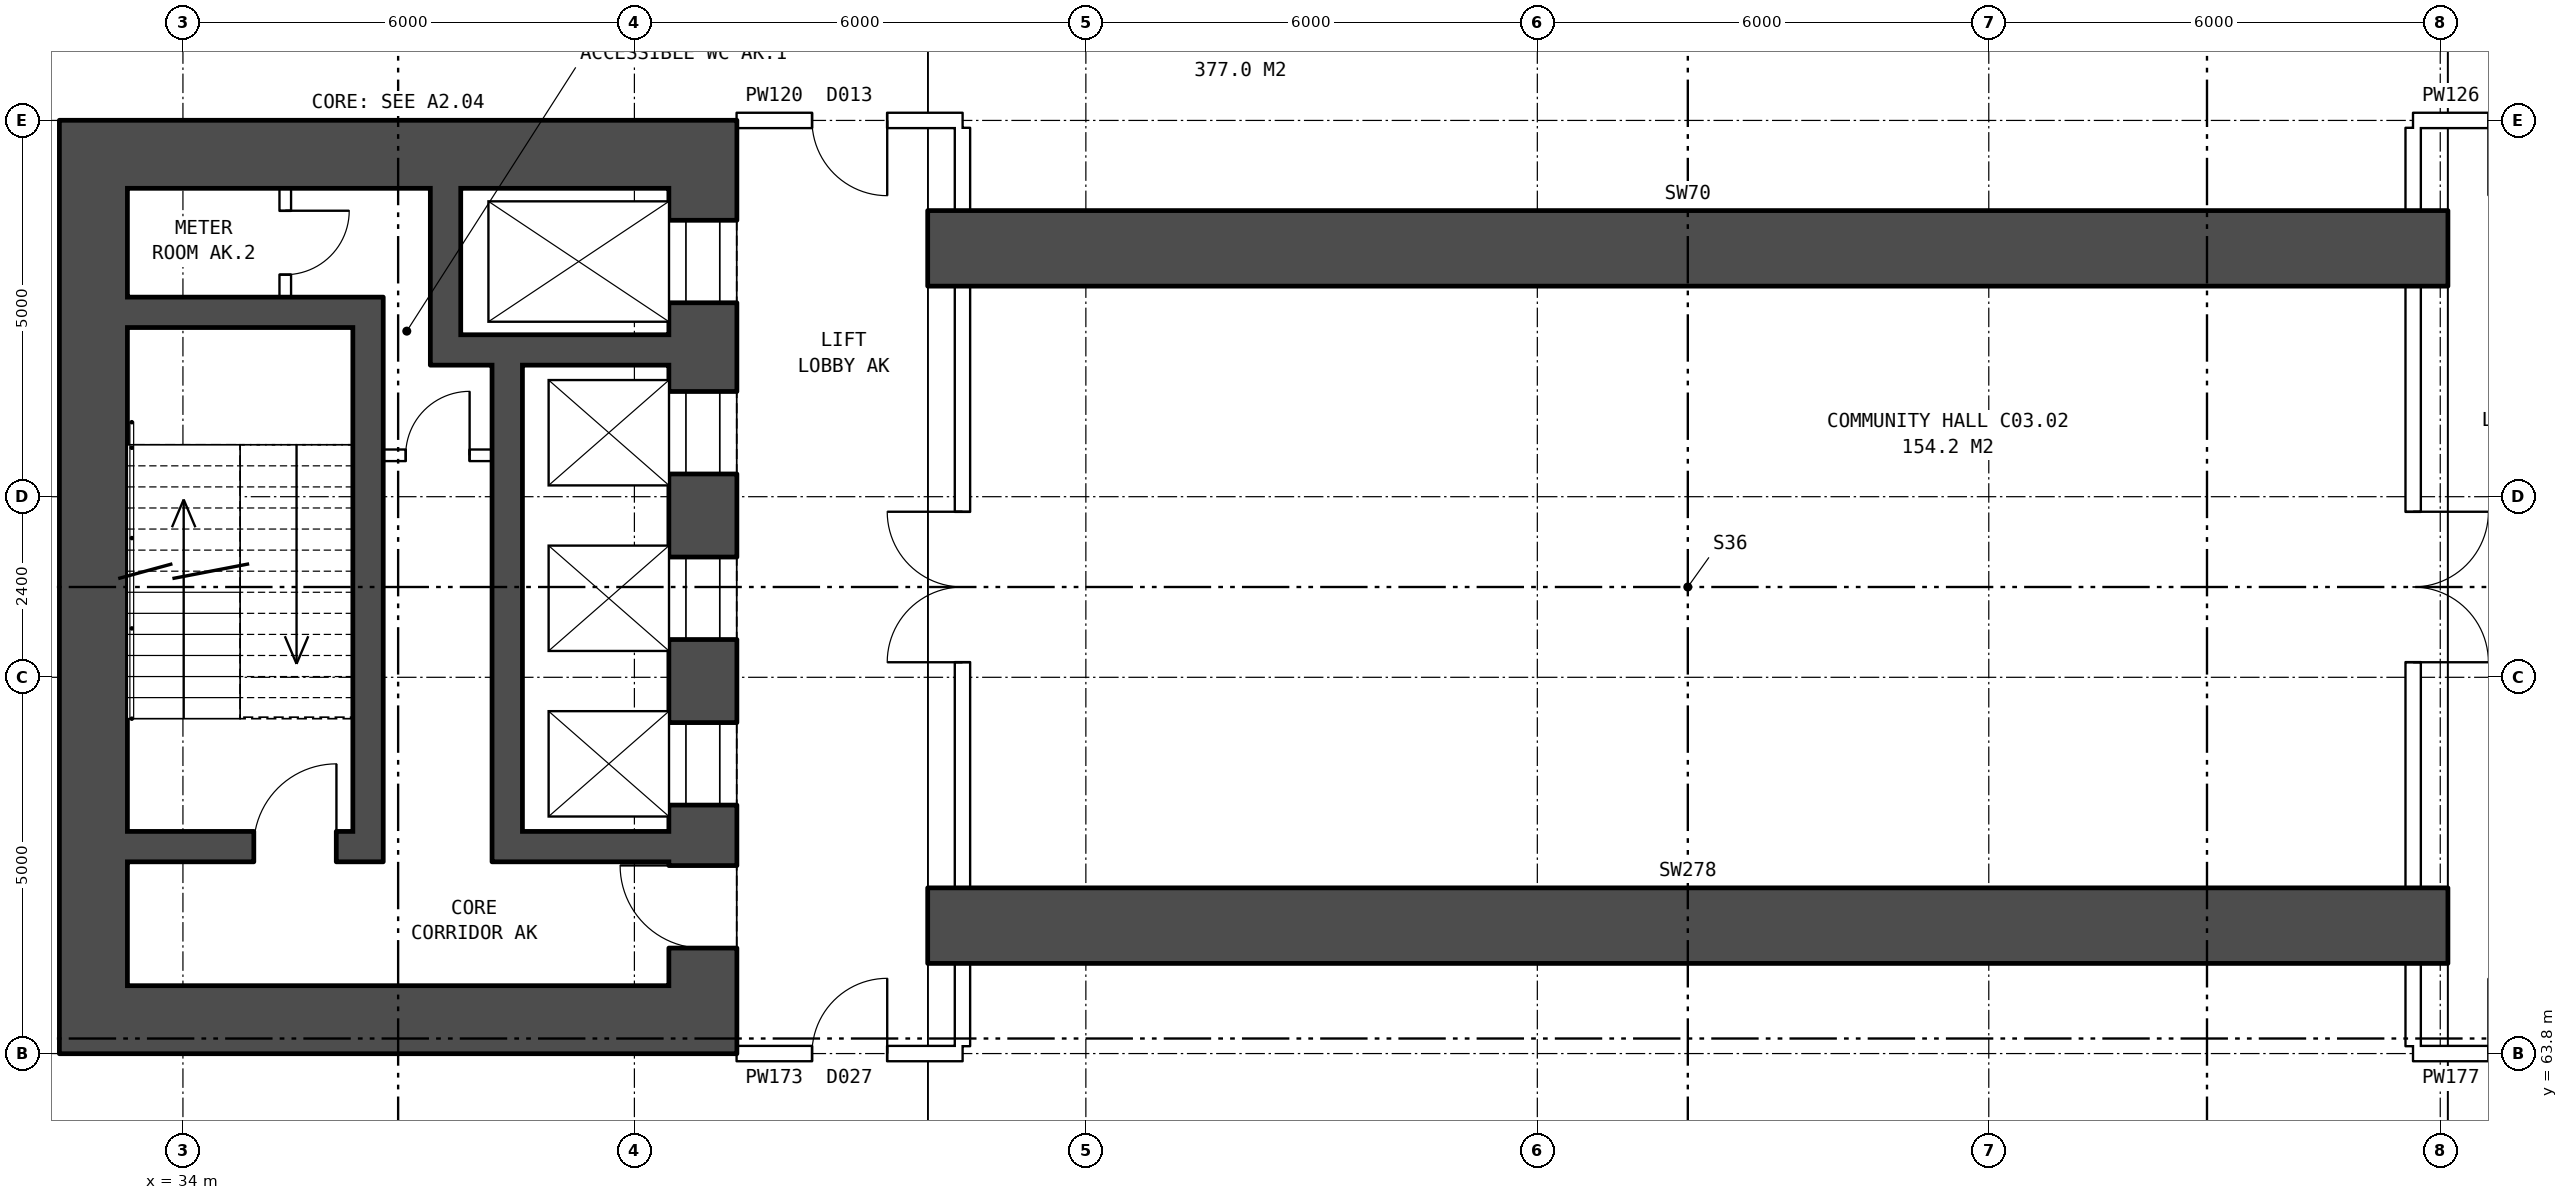
"""IFC4 building model, lengths in metres.
Left out: names, types, materials, properties, quantities, classifications, styles, units other than length and angle.
Written with IfcOpenShell. Run it as: python <this file> out.ifc"""

import sys

from ifc_helpers import new_model, si_unit, direction, frame, frame_2d, origin, place, context, subcontext, project, spatial, rectangle, extrude, element, fill, save


model = new_model("IFC4")
c1 = context("Model", 3, precision=1e-05, world=origin(), true_north=direction((0.0, 1.0)))
c2 = subcontext(c1, "Body", "Model", "MODEL_VIEW")
j1 = project(units=[si_unit("LENGTHUNIT", "METRE"), si_unit("PLANEANGLEUNIT", "RADIAN")], contexts=[c1])
p1 = place(None, origin())
s1 = spatial("IfcSite", under=j1, at=p1, CompositionType="ELEMENT")
p2 = place(p1, origin())
s2 = spatial("IfcBuilding", under=s1, at=p2, CompositionType="ELEMENT")
p3 = place(p2, frame((0.0, 0.0, 14.7)))
s3 = spatial("IfcBuildingStorey", under=s2, at=p3, CompositionType="ELEMENT", Elevation=14.7)
for number, where, z_axis, x_axis in (
    (1, (43.9, 65.5, 0.0), (0.0, 0.0, 1.0), (1.0, 0.0, 0.0)),
    (2, (43.9, 74.5, 0.0), (0.0, 0.0, 1.0), (1.0, 0.0, 0.0)),
):
    element("IfcWall", number, at=place(p3, frame(where, z_axis=z_axis, x_axis=x_axis)), inside=s3, PredefinedType="SHEAR", context=c2, shape_type="SweptSolid", body=[
        extrude(rectangle(XDim=20.2, YDim=1.0, at=frame_2d((10.1, 0.0))), origin(), (0.0, 0.0, 1.0), 4.0),
    ])
p4 = place(p3, frame((63.64, 63.9, 0.0), z_axis=(0.0, 0.0, 1.0), x_axis=(0.0, 1.0, 0.0)))
e3 = element("IfcWall", 3, at=p4, inside=s3, PredefinedType="PARTITIONING", context=c2, shape_type="SweptSolid", body=[
    extrude(rectangle(XDim=12.2, YDim=0.2, at=frame_2d((6.1, 0.0))), origin(), (0.0, 0.0, 1.0), 4.0),
])
p5 = place(p4, frame((5.1, 0.0, 0.0)))
e4 = element("IfcOpeningElement", 4, at=p5, cuts=e3, PredefinedType="OPENING", context=c2, shape_type="SweptSolid", body=[
    extrude(rectangle(XDim=2.0, YDim=2.1, at=frame_2d((1.0, 1.05))), frame((0.0, 0.11, 0.0), z_axis=(0.0, -1.0, 0.0), x_axis=(1.0, 0.0, 0.0)), (0.0, 0.0, 1.0), 0.22),
])
p6 = place(p3, frame((40.91, 75.3, 0.0), z_axis=(0.0, 0.0, 1.0), x_axis=(0.0, -1.0, 0.0)))
e5 = element("IfcWall", 5, at=p6, inside=s3, PredefinedType="SHEAR", context=c2, shape_type="SweptSolid", body=[
    extrude(rectangle(XDim=10.6, YDim=0.9, at=frame_2d((5.3, 0.0))), origin(), (0.0, 0.0, 1.0), 4.0),
])
p7 = place(p6, frame((0.425, 0.0, 0.0)))
e6 = element("IfcOpeningElement", 6, at=p7, cuts=e5, PredefinedType="OPENING", context=c2, shape_type="SweptSolid", body=[
    extrude(rectangle(XDim=1.1, YDim=2.1, at=frame_2d((0.55, 1.05))), frame((0.0, 0.46, 0.0), z_axis=(0.0, -1.0, 0.0), x_axis=(1.0, 0.0, 0.0)), (0.0, 0.0, 1.0), 0.92),
])
p8 = place(p6, frame((2.7, 0.0, 0.0)))
e7 = element("IfcOpeningElement", 7, at=p8, cuts=e5, PredefinedType="OPENING", context=c2, shape_type="SweptSolid", body=[
    extrude(rectangle(XDim=1.1, YDim=2.1, at=frame_2d((0.55, 1.05))), frame((0.0, 0.46, 0.0), z_axis=(0.0, -1.0, 0.0), x_axis=(1.0, 0.0, 0.0)), (0.0, 0.0, 1.0), 0.92),
])
p9 = place(p6, frame((4.9, 0.0, 0.0)))
e8 = element("IfcOpeningElement", 8, at=p9, cuts=e5, PredefinedType="OPENING", context=c2, shape_type="SweptSolid", body=[
    extrude(rectangle(XDim=1.1, YDim=2.1, at=frame_2d((0.55, 1.05))), frame((0.0, 0.46, 0.0), z_axis=(0.0, -1.0, 0.0), x_axis=(1.0, 0.0, 0.0)), (0.0, 0.0, 1.0), 0.92),
])
p10 = place(p6, frame((7.1, 0.0, 0.0)))
e9 = element("IfcOpeningElement", 9, at=p10, cuts=e5, PredefinedType="OPENING", context=c2, shape_type="SweptSolid", body=[
    extrude(rectangle(XDim=1.1, YDim=2.1, at=frame_2d((0.55, 1.05))), frame((0.0, 0.46, 0.0), z_axis=(0.0, -1.0, 0.0), x_axis=(1.0, 0.0, 0.0)), (0.0, 0.0, 1.0), 0.92),
])
p11 = place(p6, frame((9.0, 0.0, 0.0)))
e10 = element("IfcOpeningElement", 10, at=p11, cuts=e5, PredefinedType="OPENING", context=c2, shape_type="SweptSolid", body=[
    extrude(rectangle(XDim=1.1, YDim=2.1, at=frame_2d((0.55, 1.05))), frame((0.0, 0.46, 0.0), z_axis=(0.0, -1.0, 0.0), x_axis=(1.0, 0.0, 0.0)), (0.0, 0.0, 1.0), 0.92),
])
p12 = place(p3, frame((32.81, 75.3, 0.0), z_axis=(0.0, 0.0, 1.0), x_axis=(0.0, -1.0, 0.0)))
e11 = element("IfcWall", 11, at=p12, inside=s3, PredefinedType="SHEAR", context=c2, shape_type="SweptSolid", body=[
    extrude(rectangle(XDim=10.6, YDim=0.9, at=frame_2d((5.3, 0.0))), origin(), (0.0, 0.0, 1.0), 4.0),
])
for number, where, z_axis, x_axis in (
    (12, (41.36, 75.75, 0.0), (0.0, 0.0, 1.0), (-1.0, 0.0, 0.0)),
    (13, (41.36, 64.25, 0.0), (0.0, 0.0, 1.0), (-1.0, 0.0, 0.0)),
):
    element("IfcWall", number, at=place(p3, frame(where, z_axis=z_axis, x_axis=x_axis)), inside=s3, PredefinedType="SHEAR", context=c2, shape_type="SweptSolid", body=[
        extrude(rectangle(XDim=9.0, YDim=0.9, at=frame_2d((4.5, 0.0))), origin(), (0.0, 0.0, 1.0), 4.0),
    ])
p13 = place(p3, frame((36.26, 73.65, 0.0), z_axis=(0.0, 0.0, 1.0), x_axis=(-1.0, 0.0, 0.0)))
e14 = element("IfcWall", 14, at=p13, inside=s3, PredefinedType="SHEAR", context=c2, shape_type="SweptSolid", body=[
    extrude(rectangle(XDim=3.0, YDim=0.4, at=frame_2d((1.5, 0.0))), origin(), (0.0, 0.0, 1.0), 4.0),
])
p14 = place(p3, frame((40.46, 73.15, 0.0), z_axis=(0.0, 0.0, 1.0), x_axis=(-1.0, 0.0, 0.0)))
e15 = element("IfcWall", 15, at=p14, inside=s3, PredefinedType="SHEAR", context=c2, shape_type="SweptSolid", body=[
    extrude(rectangle(XDim=3.17, YDim=0.4, at=frame_2d((1.585, 0.0))), origin(), (0.0, 0.0, 1.0), 4.0),
])
p15 = place(p3, frame((38.11, 71.75, 0.0), z_axis=(0.0, 0.0, 1.0), x_axis=(-1.0, 0.0, 0.0)))
e16 = element("IfcWall", 16, at=p15, inside=s3, PredefinedType="PARTITIONING", context=c2, shape_type="SweptSolid", body=[
    extrude(rectangle(XDim=1.45, YDim=0.15, at=frame_2d((0.725, 0.0))), origin(), (0.0, 0.0, 1.0), 4.0),
])
p16 = place(p15, frame((0.3, 0.0, 0.0)))
e17 = element("IfcOpeningElement", 17, at=p16, cuts=e16, PredefinedType="OPENING", context=c2, shape_type="SweptSolid", body=[
    extrude(rectangle(XDim=0.85, YDim=2.1, at=frame_2d((0.425, 1.05))), frame((0.0, 0.085, 0.0), z_axis=(0.0, -1.0, 0.0), x_axis=(1.0, 0.0, 0.0)), (0.0, 0.0, 1.0), 0.17),
])
p17 = place(p3, frame((40.46, 66.55, 0.0), z_axis=(0.0, 0.0, 1.0), x_axis=(-1.0, 0.0, 0.0)))
e18 = element("IfcWall", 18, at=p17, inside=s3, PredefinedType="SHEAR", context=c2, shape_type="SweptSolid", body=[
    extrude(rectangle(XDim=1.95, YDim=0.4, at=frame_2d((0.975, 0.0))), origin(), (0.0, 0.0, 1.0), 4.0),
])
p18 = place(p3, frame((36.26, 66.55, 0.0), z_axis=(0.0, 0.0, 1.0), x_axis=(-1.0, 0.0, 0.0)))
e19 = element("IfcWall", 19, at=p18, inside=s3, PredefinedType="SHEAR", context=c2, shape_type="SweptSolid", body=[
    extrude(rectangle(XDim=3.0, YDim=0.4, at=frame_2d((1.5, 0.0))), origin(), (0.0, 0.0, 1.0), 4.0),
])
p19 = place(p18, frame((0.22, 0.0, 0.0)))
e20 = element("IfcOpeningElement", 20, at=p19, cuts=e19, PredefinedType="OPENING", context=c2, shape_type="SweptSolid", body=[
    extrude(rectangle(XDim=1.1, YDim=2.1, at=frame_2d((0.55, 1.05))), frame((0.0, 0.21, 0.0), z_axis=(0.0, -1.0, 0.0), x_axis=(1.0, 0.0, 0.0)), (0.0, 0.0, 1.0), 0.42),
])
p20 = place(p3, frame((38.31, 72.95, 0.0), z_axis=(0.0, 0.0, 1.0), x_axis=(0.0, -1.0, 0.0)))
e21 = element("IfcWall", 21, at=p20, inside=s3, PredefinedType="SHEAR", context=c2, shape_type="SweptSolid", body=[
    extrude(rectangle(XDim=6.6, YDim=0.4, at=frame_2d((3.3, 0.0))), origin(), (0.0, 0.0, 1.0), 4.0),
])
p21 = place(p3, frame((37.49, 75.3, 0.0), z_axis=(0.0, 0.0, 1.0), x_axis=(0.0, -1.0, 0.0)))
e22 = element("IfcWall", 22, at=p21, inside=s3, PredefinedType="SHEAR", context=c2, shape_type="SweptSolid", body=[
    extrude(rectangle(XDim=1.95, YDim=0.4, at=frame_2d((0.975, 0.0))), origin(), (0.0, 0.0, 1.0), 4.0),
])
p22 = place(p3, frame((36.46, 73.85, 0.0), z_axis=(0.0, 0.0, 1.0), x_axis=(0.0, -1.0, 0.0)))
e23 = element("IfcWall", 23, at=p22, inside=s3, PredefinedType="SHEAR", context=c2, shape_type="SweptSolid", body=[
    extrude(rectangle(XDim=7.5, YDim=0.4, at=frame_2d((3.75, 0.0))), origin(), (0.0, 0.0, 1.0), 4.0),
])
p23 = place(p3, frame((35.36, 75.3, 0.0), z_axis=(0.0, 0.0, 1.0), x_axis=(0.0, -1.0, 0.0)))
e24 = element("IfcWall", 24, at=p23, inside=s3, PredefinedType="PARTITIONING", context=c2, shape_type="SweptSolid", body=[
    extrude(rectangle(XDim=1.45, YDim=0.15, at=frame_2d((0.725, 0.0))), origin(), (0.0, 0.0, 1.0), 4.0),
])
p24 = place(p23, frame((0.3, 0.0, 0.0)))
e25 = element("IfcOpeningElement", 25, at=p24, cuts=e24, PredefinedType="OPENING", context=c2, shape_type="SweptSolid", body=[
    extrude(rectangle(XDim=0.85, YDim=2.1, at=frame_2d((0.425, 1.05))), frame((0.0, 0.085, 0.0), z_axis=(0.0, -1.0, 0.0), x_axis=(1.0, 0.0, 0.0)), (0.0, 0.0, 1.0), 0.17),
])
p25 = place(p3, frame((44.36, 63.9, 0.0), z_axis=(0.0, 0.0, 1.0), x_axis=(0.0, 1.0, 0.0)))
e26 = element("IfcWall", 26, at=p25, inside=s3, PredefinedType="PARTITIONING", context=c2, shape_type="SweptSolid", body=[
    extrude(rectangle(XDim=12.2, YDim=0.2, at=frame_2d((6.1, 0.0))), origin(), (0.0, 0.0, 1.0), 4.0),
])
p26 = place(p25, frame((5.1, 0.0, 0.0)))
e27 = element("IfcOpeningElement", 27, at=p26, cuts=e26, PredefinedType="OPENING", context=c2, shape_type="SweptSolid", body=[
    extrude(rectangle(XDim=2.0, YDim=2.1, at=frame_2d((1.0, 1.05))), frame((0.0, 0.11, 0.0), z_axis=(0.0, -1.0, 0.0), x_axis=(1.0, 0.0, 0.0)), (0.0, 0.0, 1.0), 0.22),
])
p27 = place(p3, frame((41.36, 63.8, 0.0), z_axis=(0.0, 0.0, 1.0), x_axis=(1.0, 0.0, 0.0)))
e28 = element("IfcWall", 28, at=p27, inside=s3, PredefinedType="PARTITIONING", context=c2, shape_type="SweptSolid", body=[
    extrude(rectangle(XDim=3.0, YDim=0.2, at=frame_2d((1.5, 0.0))), origin(), (0.0, 0.0, 1.0), 4.0),
])
p28 = place(p27, frame((1.0, 0.0, 0.0)))
e29 = element("IfcOpeningElement", 29, at=p28, cuts=e28, PredefinedType="OPENING", context=c2, shape_type="SweptSolid", body=[
    extrude(rectangle(XDim=1.0, YDim=2.1, at=frame_2d((0.5, 1.05))), frame((0.0, 0.11, 0.0), z_axis=(0.0, -1.0, 0.0), x_axis=(1.0, 0.0, 0.0)), (0.0, 0.0, 1.0), 0.22),
])
p29 = place(p3, frame((63.64, 63.8, 0.0), z_axis=(0.0, 0.0, 1.0), x_axis=(1.0, 0.0, 0.0)))
e30 = element("IfcWall", 30, at=p29, inside=s3, PredefinedType="PARTITIONING", context=c2, shape_type="SweptSolid", body=[
    extrude(rectangle(XDim=3.0, YDim=0.2, at=frame_2d((1.5, 0.0))), origin(), (0.0, 0.0, 1.0), 4.0),
])
p30 = place(p29, frame((1.0, 0.0, 0.0)))
e31 = element("IfcOpeningElement", 31, at=p30, cuts=e30, PredefinedType="OPENING", context=c2, shape_type="SweptSolid", body=[
    extrude(rectangle(XDim=1.0, YDim=2.1, at=frame_2d((0.5, 1.05))), frame((0.0, 0.11, 0.0), z_axis=(0.0, -1.0, 0.0), x_axis=(1.0, 0.0, 0.0)), (0.0, 0.0, 1.0), 0.22),
])
p31 = place(p3, frame((41.36, 76.2, 0.0), z_axis=(0.0, 0.0, 1.0), x_axis=(1.0, 0.0, 0.0)))
e32 = element("IfcWall", 32, at=p31, inside=s3, PredefinedType="PARTITIONING", context=c2, shape_type="SweptSolid", body=[
    extrude(rectangle(XDim=3.0, YDim=0.2, at=frame_2d((1.5, 0.0))), origin(), (0.0, 0.0, 1.0), 4.0),
])
p32 = place(p31, frame((1.0, 0.0, 0.0)))
e33 = element("IfcOpeningElement", 33, at=p32, cuts=e32, PredefinedType="OPENING", context=c2, shape_type="SweptSolid", body=[
    extrude(rectangle(XDim=1.0, YDim=2.1, at=frame_2d((0.5, 1.05))), frame((0.0, 0.11, 0.0), z_axis=(0.0, -1.0, 0.0), x_axis=(1.0, 0.0, 0.0)), (0.0, 0.0, 1.0), 0.22),
])
p33 = place(p3, frame((63.64, 76.2, 0.0), z_axis=(0.0, 0.0, 1.0), x_axis=(1.0, 0.0, 0.0)))
e34 = element("IfcWall", 34, at=p33, inside=s3, PredefinedType="PARTITIONING", context=c2, shape_type="SweptSolid", body=[
    extrude(rectangle(XDim=3.0, YDim=0.2, at=frame_2d((1.5, 0.0))), origin(), (0.0, 0.0, 1.0), 4.0),
])
p34 = place(p33, frame((1.0, 0.0, 0.0)))
e35 = element("IfcOpeningElement", 35, at=p34, cuts=e34, PredefinedType="OPENING", context=c2, shape_type="SweptSolid", body=[
    extrude(rectangle(XDim=1.0, YDim=2.1, at=frame_2d((0.5, 1.05))), frame((0.0, 0.11, 0.0), z_axis=(0.0, -1.0, 0.0), x_axis=(1.0, 0.0, 0.0)), (0.0, 0.0, 1.0), 0.22),
])
p35 = place(p5, frame((2.0, 0.0, 0.0), z_axis=(0.0, 0.0, 1.0), x_axis=(-1.0, 0.0, 0.0)))
e36 = element("IfcDoor", 36, at=p35, inside=s3, OperationType="DOUBLE_DOOR_SINGLE_SWING", PredefinedType="DOOR", context=c2, shape_type="SweptSolid", body=[
    extrude(rectangle(XDim=2.0, YDim=2.1, at=frame_2d((1.0, 1.05))), frame((0.0, 0.025, 0.0), z_axis=(0.0, -1.0, 0.0), x_axis=(1.0, 0.0, 0.0)), (0.0, 0.0, 1.0), 0.05),
])
fill(e4, e36)
p36 = place(p7, origin())
e37 = element("IfcDoor", 37, at=p36, inside=s3, OperationType="DOUBLE_DOOR_SLIDING", PredefinedType="DOOR", context=c2, shape_type="SweptSolid", body=[
    extrude(rectangle(XDim=1.1, YDim=2.1, at=frame_2d((0.55, 1.05))), frame((0.0, -0.385, 0.0), z_axis=(0.0, -1.0, 0.0), x_axis=(1.0, 0.0, 0.0)), (0.0, 0.0, 1.0), 0.05),
])
fill(e6, e37)
p37 = place(p8, origin())
e38 = element("IfcDoor", 38, at=p37, inside=s3, OperationType="DOUBLE_DOOR_SLIDING", PredefinedType="DOOR", context=c2, shape_type="SweptSolid", body=[
    extrude(rectangle(XDim=1.1, YDim=2.1, at=frame_2d((0.55, 1.05))), frame((0.0, -0.385, 0.0), z_axis=(0.0, -1.0, 0.0), x_axis=(1.0, 0.0, 0.0)), (0.0, 0.0, 1.0), 0.05),
])
fill(e7, e38)
p38 = place(p9, origin())
e39 = element("IfcDoor", 39, at=p38, inside=s3, OperationType="DOUBLE_DOOR_SLIDING", PredefinedType="DOOR", context=c2, shape_type="SweptSolid", body=[
    extrude(rectangle(XDim=1.1, YDim=2.1, at=frame_2d((0.55, 1.05))), frame((0.0, -0.385, 0.0), z_axis=(0.0, -1.0, 0.0), x_axis=(1.0, 0.0, 0.0)), (0.0, 0.0, 1.0), 0.05),
])
fill(e8, e39)
p39 = place(p10, origin())
e40 = element("IfcDoor", 40, at=p39, inside=s3, OperationType="DOUBLE_DOOR_SLIDING", PredefinedType="DOOR", context=c2, shape_type="SweptSolid", body=[
    extrude(rectangle(XDim=1.1, YDim=2.1, at=frame_2d((0.55, 1.05))), frame((0.0, -0.385, 0.0), z_axis=(0.0, -1.0, 0.0), x_axis=(1.0, 0.0, 0.0)), (0.0, 0.0, 1.0), 0.05),
])
fill(e9, e40)
p40 = place(p11, frame((1.1, 0.0, 0.0), z_axis=(0.0, 0.0, 1.0), x_axis=(-1.0, 0.0, 0.0)))
e41 = element("IfcDoor", 41, at=p40, inside=s3, OperationType="SINGLE_SWING_RIGHT", PredefinedType="DOOR", context=c2, shape_type="SweptSolid", body=[
    extrude(rectangle(XDim=1.1, YDim=2.1, at=frame_2d((0.55, 1.05))), frame((0.0, 0.435, 0.0), z_axis=(0.0, -1.0, 0.0), x_axis=(1.0, 0.0, 0.0)), (0.0, 0.0, 1.0), 0.05),
])
fill(e10, e41)
p41 = place(p19, frame((1.1, 0.0, 0.0), z_axis=(0.0, 0.0, 1.0), x_axis=(-1.0, 0.0, 0.0)))
e42 = element("IfcDoor", 42, at=p41, inside=s3, OperationType="SINGLE_SWING_RIGHT", PredefinedType="DOOR", context=c2, shape_type="SweptSolid", body=[
    extrude(rectangle(XDim=1.1, YDim=2.1, at=frame_2d((0.55, 1.05))), frame((0.0, 0.025, 0.0), z_axis=(0.0, -1.0, 0.0), x_axis=(1.0, 0.0, 0.0)), (0.0, 0.0, 1.0), 0.05),
])
fill(e20, e42)
p42 = place(p16, frame((0.85, 0.0, 0.0), z_axis=(0.0, 0.0, 1.0), x_axis=(-1.0, 0.0, 0.0)))
e43 = element("IfcDoor", 43, at=p42, inside=s3, OperationType="SINGLE_SWING_RIGHT", PredefinedType="DOOR", context=c2, shape_type="SweptSolid", body=[
    extrude(rectangle(XDim=0.85, YDim=2.1, at=frame_2d((0.425, 1.05))), frame((0.0, 0.025, 0.0), z_axis=(0.0, -1.0, 0.0), x_axis=(1.0, 0.0, 0.0)), (0.0, 0.0, 1.0), 0.05),
])
fill(e17, e43)
p43 = place(p24, origin())
e44 = element("IfcDoor", 44, at=p43, inside=s3, OperationType="SINGLE_SWING_LEFT", PredefinedType="DOOR", context=c2, shape_type="SweptSolid", body=[
    extrude(rectangle(XDim=0.85, YDim=2.1, at=frame_2d((0.425, 1.05))), frame((0.0, 0.025, 0.0), z_axis=(0.0, -1.0, 0.0), x_axis=(1.0, 0.0, 0.0)), (0.0, 0.0, 1.0), 0.05),
])
fill(e25, e44)
p44 = place(p26, origin())
e45 = element("IfcDoor", 45, at=p44, inside=s3, OperationType="DOUBLE_DOOR_SINGLE_SWING", PredefinedType="DOOR", context=c2, shape_type="SweptSolid", body=[
    extrude(rectangle(XDim=2.0, YDim=2.1, at=frame_2d((1.0, 1.05))), frame((0.0, 0.025, 0.0), z_axis=(0.0, -1.0, 0.0), x_axis=(1.0, 0.0, 0.0)), (0.0, 0.0, 1.0), 0.05),
])
fill(e27, e45)
p45 = place(p28, origin())
e46 = element("IfcDoor", 46, at=p45, inside=s3, OperationType="SINGLE_SWING_RIGHT", PredefinedType="DOOR", context=c2, shape_type="SweptSolid", body=[
    extrude(rectangle(XDim=1.0, YDim=2.1, at=frame_2d((0.5, 1.05))), frame((0.0, 0.025, 0.0), z_axis=(0.0, -1.0, 0.0), x_axis=(1.0, 0.0, 0.0)), (0.0, 0.0, 1.0), 0.05),
])
fill(e29, e46)
p46 = place(p32, frame((1.0, 0.0, 0.0), z_axis=(0.0, 0.0, 1.0), x_axis=(-1.0, 0.0, 0.0)))
e47 = element("IfcDoor", 47, at=p46, inside=s3, OperationType="SINGLE_SWING_LEFT", PredefinedType="DOOR", context=c2, shape_type="SweptSolid", body=[
    extrude(rectangle(XDim=1.0, YDim=2.1, at=frame_2d((0.5, 1.05))), frame((0.0, 0.025, 0.0), z_axis=(0.0, -1.0, 0.0), x_axis=(1.0, 0.0, 0.0)), (0.0, 0.0, 1.0), 0.05),
])
fill(e33, e47)
save(model, sys.argv[1])
